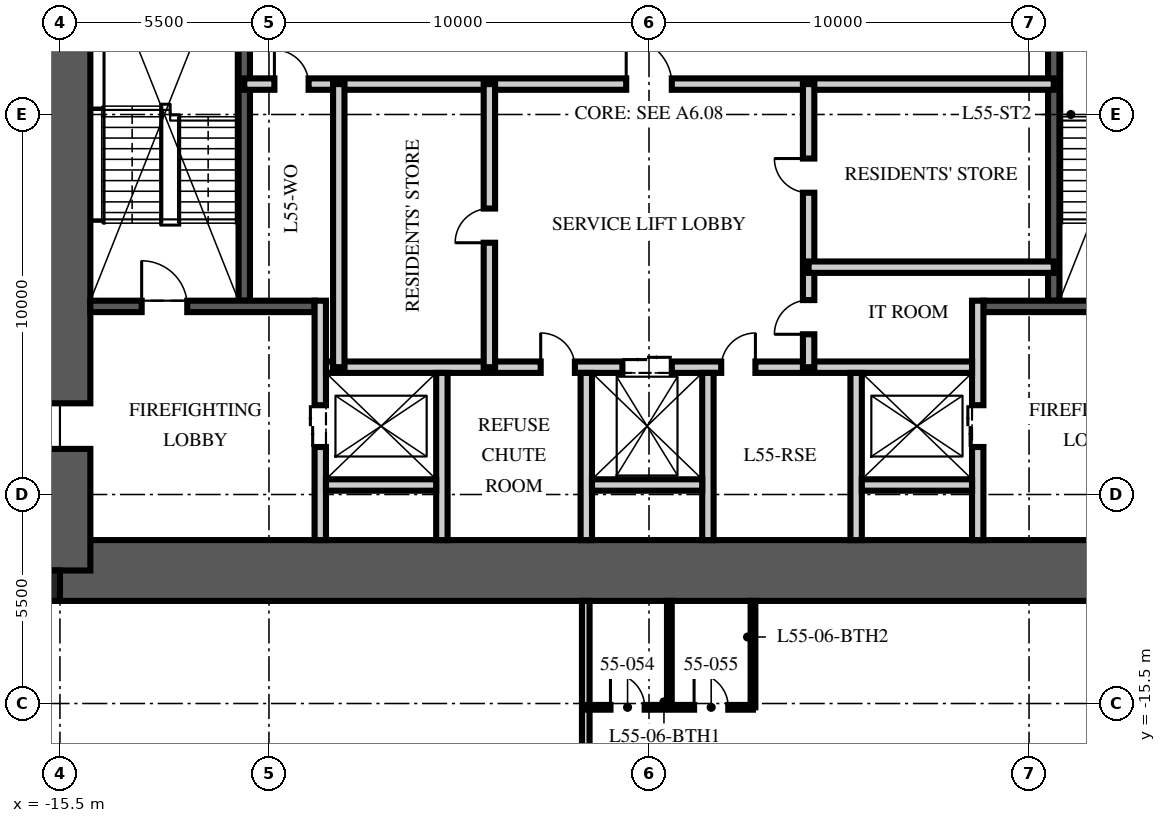
"""IFC4 building model, lengths in metres.
Left out: names, types, materials, properties, quantities, classifications, styles, units other than length and angle.
Written with IfcOpenShell. Run it as: python <this file> out.ifc"""

import sys

from ifc_helpers import new_model, si_unit, direction, frame, frame_2d, origin, origin_2d, place, context, subcontext, project, spatial, rectangle, extrude, element, fill, save


model = new_model("IFC4")
c1 = context("Model", 3, precision=1e-05, world=origin(), true_north=direction((0.0, 1.0)))
c2 = subcontext(c1, "Body", "Model", "MODEL_VIEW")
j1 = project(units=[si_unit("LENGTHUNIT", "METRE"), si_unit("PLANEANGLEUNIT", "RADIAN")], contexts=[c1])
p1 = place(None, origin())
s1 = spatial("IfcSite", under=j1, at=p1, CompositionType="ELEMENT")
p2 = place(p1, origin())
s2 = spatial("IfcBuilding", under=s1, at=p2, CompositionType="ELEMENT")
p3 = place(p2, frame((0.0, 0.0, 222.0)))
s3 = spatial("IfcBuildingStorey", under=s2, at=p3, CompositionType="ELEMENT", Elevation=222.0)
p4 = place(p3, frame((-15.5, -12.0, -0.25), z_axis=(0.0, 0.0, 1.0), x_axis=(1.0, 0.0, 0.0)))
e1 = element("IfcWall", 1, at=p4, inside=s3, PredefinedType="SHEAR", context=c2, shape_type="SweptSolid", body=[
    extrude(rectangle(XDim=31.0, YDim=1.6, at=frame_2d((15.5, 0.0))), origin(), (0.0, 0.0, 1.0), 3.75),
])
p5 = place(p3, frame((-15.5, -12.0, -0.25), z_axis=(0.0, 0.0, 1.0), x_axis=(0.0, 1.0, 0.0)))
e2 = element("IfcWall", 2, at=p5, inside=s3, PredefinedType="SHEAR", context=c2, shape_type="SweptSolid", body=[
    extrude(rectangle(XDim=24.0, YDim=1.6, at=frame_2d((12.0, 0.0))), origin(), (0.0, 0.0, 1.0), 3.75),
])
p6 = place(p5, frame((3.2, 0.0, 0.25)))
e3 = element("IfcOpeningElement", 3, at=p6, cuts=e2, PredefinedType="OPENING", context=c2, shape_type="SweptSolid", body=[
    extrude(rectangle(XDim=1.2, YDim=2.1, at=frame_2d((0.6, 1.05))), frame((0.0, 0.81, 0.0), z_axis=(0.0, -1.0, 0.0), x_axis=(1.0, 0.0, 0.0)), (0.0, 0.0, 1.0), 1.62),
])
p7 = place(p5, frame((19.3, 0.0, 0.25)))
e4 = element("IfcOpeningElement", 4, at=p7, cuts=e2, PredefinedType="OPENING", context=c2, shape_type="SweptSolid", body=[
    extrude(rectangle(XDim=1.8, YDim=2.1, at=frame_2d((0.9, 1.05))), frame((0.0, 0.81, 0.0), z_axis=(0.0, -1.0, 0.0), x_axis=(1.0, 0.0, 0.0)), (0.0, 0.0, 1.0), 1.62),
])
p8 = place(p3, frame((-15.9, -12.4, -0.25), z_axis=(0.0, 0.0, 1.0), x_axis=(1.0, 0.0, 0.0)))
e5 = element("IfcColumn", 5, at=p8, inside=s3, PredefinedType="COLUMN", context=c2, shape_type="SweptSolid", body=[
    extrude(rectangle(XDim=0.8, YDim=0.8, at=origin_2d()), origin(), (0.0, 0.0, 1.0), 3.75),
])
p9 = place(p3, frame((-10.65, -4.9, 0.0), z_axis=(0.0, 0.0, 1.0), x_axis=(0.0, 1.0, 0.0)))
e6 = element("IfcWall", 6, at=p9, inside=s3, PredefinedType="SOLIDWALL", context=c2, shape_type="SweptSolid", body=[
    extrude(rectangle(XDim=10.1, YDim=0.3, at=frame_2d((5.05, 0.0))), origin(), (0.0, 0.0, 1.0), 3.5),
])
p10 = place(p3, frame((-14.7, -5.05, 0.0), z_axis=(0.0, 0.0, 1.0), x_axis=(1.0, 0.0, 0.0)))
e7 = element("IfcWall", 7, at=p10, inside=s3, PredefinedType="SOLIDWALL", context=c2, shape_type="SweptSolid", body=[
    extrude(rectangle(XDim=5.9, YDim=0.3, at=frame_2d((2.95, 0.0))), origin(), (0.0, 0.0, 1.0), 3.5),
])
p11 = place(p10, frame((1.35, 0.0, 0.0)))
e8 = element("IfcOpeningElement", 8, at=p11, cuts=e7, PredefinedType="OPENING", context=c2, shape_type="SweptSolid", body=[
    extrude(rectangle(XDim=1.2, YDim=2.1, at=frame_2d((0.6, 1.05))), frame((0.0, 0.16, 0.0), z_axis=(0.0, -1.0, 0.0), x_axis=(1.0, 0.0, 0.0)), (0.0, 0.0, 1.0), 0.32),
])
p12 = place(p3, frame((-8.65, -11.2, 0.0), z_axis=(0.0, 0.0, 1.0), x_axis=(0.0, 1.0, 0.0)))
e9 = element("IfcWall", 9, at=p12, inside=s3, PredefinedType="PARTITIONING", context=c2, shape_type="SweptSolid", body=[
    extrude(rectangle(XDim=6.3, YDim=0.3, at=frame_2d((3.15, 0.0))), origin(), (0.0, 0.0, 1.0), 3.5),
])
p13 = place(p12, frame((2.45, 0.0, 0.0)))
e10 = element("IfcOpeningElement", 10, at=p13, cuts=e9, PredefinedType="OPENING", context=c2, shape_type="SweptSolid", body=[
    extrude(rectangle(XDim=1.1, YDim=2.1, at=frame_2d((0.55, 1.05))), frame((0.0, 0.16, 0.0), z_axis=(0.0, -1.0, 0.0), x_axis=(1.0, 0.0, 0.0)), (0.0, 0.0, 1.0), 0.32),
])
p14 = place(p3, frame((10.65, -4.9, 0.0), z_axis=(0.0, 0.0, 1.0), x_axis=(0.0, 1.0, 0.0)))
e11 = element("IfcWall", 11, at=p14, inside=s3, PredefinedType="SOLIDWALL", context=c2, shape_type="SweptSolid", body=[
    extrude(rectangle(XDim=10.1, YDim=0.3, at=frame_2d((5.05, 0.0))), origin(), (0.0, 0.0, 1.0), 3.5),
])
p15 = place(p3, frame((14.7, -5.05, 0.0), z_axis=(0.0, 0.0, 1.0), x_axis=(-1.0, 0.0, 0.0)))
e12 = element("IfcWall", 12, at=p15, inside=s3, PredefinedType="SOLIDWALL", context=c2, shape_type="SweptSolid", body=[
    extrude(rectangle(XDim=5.9, YDim=0.3, at=frame_2d((2.95, 0.0))), origin(), (0.0, 0.0, 1.0), 3.5),
])
p16 = place(p15, frame((1.35, 0.0, 0.0)))
e13 = element("IfcOpeningElement", 13, at=p16, cuts=e12, PredefinedType="OPENING", context=c2, shape_type="SweptSolid", body=[
    extrude(rectangle(XDim=1.2, YDim=2.1, at=frame_2d((0.6, 1.05))), frame((0.0, 0.16, 0.0), z_axis=(0.0, -1.0, 0.0), x_axis=(1.0, 0.0, 0.0)), (0.0, 0.0, 1.0), 0.32),
])
p17 = place(p3, frame((8.65, -11.2, 0.0), z_axis=(0.0, 0.0, 1.0), x_axis=(0.0, 1.0, 0.0)))
e14 = element("IfcWall", 14, at=p17, inside=s3, PredefinedType="PARTITIONING", context=c2, shape_type="SweptSolid", body=[
    extrude(rectangle(XDim=6.3, YDim=0.3, at=frame_2d((3.15, 0.0))), origin(), (0.0, 0.0, 1.0), 3.5),
])
p18 = place(p17, frame((2.45, 0.0, 0.0)))
e15 = element("IfcOpeningElement", 15, at=p18, cuts=e14, PredefinedType="OPENING", context=c2, shape_type="SweptSolid", body=[
    extrude(rectangle(XDim=1.1, YDim=2.1, at=frame_2d((0.55, 1.05))), frame((0.0, 0.16, 0.0), z_axis=(0.0, -1.0, 0.0), x_axis=(1.0, 0.0, 0.0)), (0.0, 0.0, 1.0), 0.32),
])
p19 = place(p3, frame((-8.5, -6.65, 0.0), z_axis=(0.0, 0.0, 1.0), x_axis=(1.0, 0.0, 0.0)))
e16 = element("IfcWall", 16, at=p19, inside=s3, PredefinedType="PARTITIONING", context=c2, shape_type="SweptSolid", body=[
    extrude(rectangle(XDim=17.0, YDim=0.3, at=frame_2d((8.5, 0.0))), origin(), (0.0, 0.0, 1.0), 3.5),
])
p20 = place(p19, frame((7.8, 0.0, 0.0)))
e17 = element("IfcOpeningElement", 17, at=p20, cuts=e16, PredefinedType="OPENING", context=c2, shape_type="SweptSolid", body=[
    extrude(rectangle(XDim=1.3, YDim=2.4, at=frame_2d((0.65, 1.2))), frame((0.0, 0.16, 0.0), z_axis=(0.0, -1.0, 0.0), x_axis=(1.0, 0.0, 0.0)), (0.0, 0.0, 1.0), 0.32),
])
p21 = place(p19, frame((5.65, 0.0, 0.0)))
e18 = element("IfcOpeningElement", 18, at=p21, cuts=e16, PredefinedType="OPENING", context=c2, shape_type="SweptSolid", body=[
    extrude(rectangle(XDim=0.9, YDim=2.1, at=frame_2d((0.45, 1.05))), frame((0.0, 0.16, 0.0), z_axis=(0.0, -1.0, 0.0), x_axis=(1.0, 0.0, 0.0)), (0.0, 0.0, 1.0), 0.32),
])
p22 = place(p19, frame((10.4, 0.0, 0.0)))
e19 = element("IfcOpeningElement", 19, at=p22, cuts=e16, PredefinedType="OPENING", context=c2, shape_type="SweptSolid", body=[
    extrude(rectangle(XDim=0.9, YDim=2.1, at=frame_2d((0.45, 1.05))), frame((0.0, 0.16, 0.0), z_axis=(0.0, -1.0, 0.0), x_axis=(1.0, 0.0, 0.0)), (0.0, 0.0, 1.0), 0.32),
])
for number, where, z_axis, x_axis in (
    (20, (-5.45, -11.2, 0.0), (0.0, 0.0, 1.0), (0.0, 1.0, 0.0)),
    (21, (-1.65, -11.2, 0.0), (0.0, 0.0, 1.0), (0.0, 1.0, 0.0)),
    (22, (1.55, -11.2, 0.0), (0.0, 0.0, 1.0), (0.0, 1.0, 0.0)),
    (23, (5.45, -11.2, 0.0), (0.0, 0.0, 1.0), (0.0, 1.0, 0.0)),
):
    element("IfcWall", number, at=place(p3, frame(where, z_axis=z_axis, x_axis=x_axis)), inside=s3, PredefinedType="PARTITIONING", context=c2, shape_type="SweptSolid", body=[
        extrude(rectangle(XDim=4.4, YDim=0.3, at=frame_2d((2.2, 0.0))), origin(), (0.0, 0.0, 1.0), 3.5),
    ])
for number, where, z_axis, x_axis in (
    (24, (-8.5, -9.75, 0.0), (0.0, 0.0, 1.0), (1.0, 0.0, 0.0)),
    (25, (-1.5, -9.75, 0.0), (0.0, 0.0, 1.0), (1.0, 0.0, 0.0)),
    (26, (5.6, -9.75, 0.0), (0.0, 0.0, 1.0), (1.0, 0.0, 0.0)),
):
    element("IfcWall", number, at=place(p3, frame(where, z_axis=z_axis, x_axis=x_axis)), inside=s3, PredefinedType="PARTITIONING", context=c2, shape_type="SweptSolid", body=[
        extrude(rectangle(XDim=2.9, YDim=0.3, at=frame_2d((1.45, 0.0))), origin(), (0.0, 0.0, 1.0), 3.5),
    ])
p23 = place(p3, frame((-10.65, 0.8, 0.0), z_axis=(0.0, 0.0, 1.0), x_axis=(1.0, 0.0, 0.0)))
e27 = element("IfcWall", 27, at=p23, inside=s3, PredefinedType="PARTITIONING", context=c2, shape_type="SweptSolid", body=[
    extrude(rectangle(XDim=21.3, YDim=0.3, at=frame_2d((10.65, 0.0))), origin(), (0.0, 0.0, 1.0), 3.5),
])
p24 = place(p23, frame((10.05, 0.0, 0.0)))
e28 = element("IfcOpeningElement", 28, at=p24, cuts=e27, PredefinedType="OPENING", context=c2, shape_type="SweptSolid", body=[
    extrude(rectangle(XDim=1.2, YDim=2.1, at=frame_2d((0.6, 1.05))), frame((0.0, 0.16, 0.0), z_axis=(0.0, -1.0, 0.0), x_axis=(1.0, 0.0, 0.0)), (0.0, 0.0, 1.0), 0.32),
])
p25 = place(p23, frame((0.793, 0.0, 0.0)))
e29 = element("IfcOpeningElement", 29, at=p25, cuts=e27, PredefinedType="OPENING", context=c2, shape_type="SweptSolid", body=[
    extrude(rectangle(XDim=0.9, YDim=2.1, at=frame_2d((0.45, 1.05))), frame((0.0, 0.16, 0.0), z_axis=(0.0, -1.0, 0.0), x_axis=(1.0, 0.0, 0.0)), (0.0, 0.0, 1.0), 0.32),
])
p26 = place(p3, frame((-4.2, -6.65, 0.0), z_axis=(0.0, 0.0, 1.0), x_axis=(0.0, 1.0, 0.0)))
e30 = element("IfcWall", 30, at=p26, inside=s3, PredefinedType="PARTITIONING", context=c2, shape_type="SweptSolid", body=[
    extrude(rectangle(XDim=7.45, YDim=0.3, at=frame_2d((3.725, 0.0))), origin(), (0.0, 0.0, 1.0), 3.5),
])
p27 = place(p26, frame((3.275, 0.0, 0.0)))
e31 = element("IfcOpeningElement", 31, at=p27, cuts=e30, PredefinedType="OPENING", context=c2, shape_type="SweptSolid", body=[
    extrude(rectangle(XDim=0.9, YDim=2.1, at=frame_2d((0.45, 1.05))), frame((0.0, 0.16, 0.0), z_axis=(0.0, -1.0, 0.0), x_axis=(1.0, 0.0, 0.0)), (0.0, 0.0, 1.0), 0.32),
])
p28 = place(p3, frame((4.2, -6.65, 0.0), z_axis=(0.0, 0.0, 1.0), x_axis=(0.0, 1.0, 0.0)))
e32 = element("IfcWall", 32, at=p28, inside=s3, PredefinedType="PARTITIONING", context=c2, shape_type="SweptSolid", body=[
    extrude(rectangle(XDim=7.45, YDim=0.3, at=frame_2d((3.725, 0.0))), origin(), (0.0, 0.0, 1.0), 3.5),
])
p29 = place(p28, frame((0.866, 0.0, 0.0)))
e33 = element("IfcOpeningElement", 33, at=p29, cuts=e32, PredefinedType="OPENING", context=c2, shape_type="SweptSolid", body=[
    extrude(rectangle(XDim=0.9, YDim=2.1, at=frame_2d((0.45, 1.05))), frame((0.0, 0.16, 0.0), z_axis=(0.0, -1.0, 0.0), x_axis=(1.0, 0.0, 0.0)), (0.0, 0.0, 1.0), 0.32),
])
p30 = place(p28, frame((4.591, 0.0, 0.0)))
e34 = element("IfcOpeningElement", 34, at=p30, cuts=e32, PredefinedType="OPENING", context=c2, shape_type="SweptSolid", body=[
    extrude(rectangle(XDim=0.9, YDim=2.1, at=frame_2d((0.45, 1.05))), frame((0.0, 0.16, 0.0), z_axis=(0.0, -1.0, 0.0), x_axis=(1.0, 0.0, 0.0)), (0.0, 0.0, 1.0), 0.32),
])
p31 = place(p3, frame((-8.163, -6.65, 0.0), z_axis=(0.0, 0.0, 1.0), x_axis=(0.0, 1.0, 0.0)))
e35 = element("IfcWall", 35, at=p31, inside=s3, PredefinedType="PARTITIONING", context=c2, shape_type="SweptSolid", body=[
    extrude(rectangle(XDim=7.45, YDim=0.3, at=frame_2d((3.725, 0.0))), origin(), (0.0, 0.0, 1.0), 3.5),
])
p32 = place(p3, frame((10.65, -4.018, 0.0), z_axis=(0.0, 0.0, 1.0), x_axis=(-1.0, 0.0, 0.0)))
e36 = element("IfcWall", 36, at=p32, inside=s3, PredefinedType="PARTITIONING", context=c2, shape_type="SweptSolid", body=[
    extrude(rectangle(XDim=6.45, YDim=0.3, at=frame_2d((3.225, 0.0))), origin(), (0.0, 0.0, 1.0), 3.5),
])
p33 = place(p3, frame((-1.664, -12.8, 0.0), z_axis=(0.0, 0.0, 1.0), x_axis=(0.0, -1.0, 0.0)))
e37 = element("IfcWall", 37, at=p33, inside=s3, PredefinedType="PARTITIONING", context=c2, shape_type="SweptSolid", body=[
    extrude(rectangle(XDim=13.4, YDim=0.2, at=frame_2d((6.7, 0.0))), origin(), (0.0, 0.0, 1.0), 2.91),
])
p34 = place(p3, frame((-1.664, -15.6, 0.0), z_axis=(0.0, 0.0, 1.0), x_axis=(1.0, 0.0, 0.0)))
e38 = element("IfcWall", 38, at=p34, inside=s3, PredefinedType="PARTITIONING", context=c2, shape_type="SweptSolid", body=[
    extrude(rectangle(XDim=4.4, YDim=0.125, at=frame_2d((2.2, 0.0))), origin(), (0.0, 0.0, 1.0), 2.6),
])
p35 = place(p34, frame((0.65, 0.0, 0.0)))
e39 = element("IfcOpeningElement", 39, at=p35, cuts=e38, PredefinedType="OPENING", context=c2, shape_type="SweptSolid", body=[
    extrude(rectangle(XDim=0.9, YDim=2.1, at=frame_2d((0.45, 1.05))), frame((0.0, 0.073, 0.0), z_axis=(0.0, -1.0, 0.0), x_axis=(1.0, 0.0, 0.0)), (0.0, 0.0, 1.0), 0.145),
])
p36 = place(p34, frame((2.85, 0.0, 0.0)))
e40 = element("IfcOpeningElement", 40, at=p36, cuts=e38, PredefinedType="OPENING", context=c2, shape_type="SweptSolid", body=[
    extrude(rectangle(XDim=0.9, YDim=2.1, at=frame_2d((0.45, 1.05))), frame((0.0, 0.073, 0.0), z_axis=(0.0, -1.0, 0.0), x_axis=(1.0, 0.0, 0.0)), (0.0, 0.0, 1.0), 0.145),
])
for number, where, z_axis, x_axis in (
    (41, (0.536, -12.8, 0.0), (0.0, 0.0, 1.0), (0.0, -1.0, 0.0)),
    (42, (2.736, -12.8, 0.0), (0.0, 0.0, 1.0), (0.0, -1.0, 0.0)),
):
    element("IfcWall", number, at=place(p3, frame(where, z_axis=z_axis, x_axis=x_axis)), inside=s3, PredefinedType="PARTITIONING", context=c2, shape_type="SweptSolid", body=[
        extrude(rectangle(XDim=2.8, YDim=0.125, at=frame_2d((1.4, 0.0))), origin(), (0.0, 0.0, 1.0), 3.5),
    ])
p37 = place(p11, origin())
e43 = element("IfcDoor", 43, at=p37, inside=s3, OperationType="SINGLE_SWING_LEFT", PredefinedType="DOOR", context=c2, shape_type="SweptSolid", body=[
    extrude(rectangle(XDim=1.2, YDim=2.1, at=frame_2d((0.6, 1.05))), frame((0.0, 0.025, 0.0), z_axis=(0.0, -1.0, 0.0), x_axis=(1.0, 0.0, 0.0)), (0.0, 0.0, 1.0), 0.05),
])
fill(e8, e43)
p38 = place(p6, origin())
e44 = element("IfcDoor", 44, at=p38, inside=s3, OperationType="SINGLE_SWING_LEFT", PredefinedType="DOOR", context=c2, shape_type="SweptSolid", body=[
    extrude(rectangle(XDim=1.2, YDim=2.1, at=frame_2d((0.6, 1.05))), frame((0.0, 0.025, 0.0), z_axis=(0.0, -1.0, 0.0), x_axis=(1.0, 0.0, 0.0)), (0.0, 0.0, 1.0), 0.05),
])
fill(e3, e44)
p39 = place(p13, origin())
e45 = element("IfcDoor", 45, at=p39, inside=s3, OperationType="DOUBLE_DOOR_SLIDING", PredefinedType="DOOR", context=c2, shape_type="SweptSolid", body=[
    extrude(rectangle(XDim=1.1, YDim=2.1, at=frame_2d((0.55, 1.05))), frame((0.0, 0.025, 0.0), z_axis=(0.0, -1.0, 0.0), x_axis=(1.0, 0.0, 0.0)), (0.0, 0.0, 1.0), 0.05),
])
fill(e10, e45)
p40 = place(p18, origin())
e46 = element("IfcDoor", 46, at=p40, inside=s3, OperationType="DOUBLE_DOOR_SLIDING", PredefinedType="DOOR", context=c2, shape_type="SweptSolid", body=[
    extrude(rectangle(XDim=1.1, YDim=2.1, at=frame_2d((0.55, 1.05))), frame((0.0, 0.025, 0.0), z_axis=(0.0, -1.0, 0.0), x_axis=(1.0, 0.0, 0.0)), (0.0, 0.0, 1.0), 0.05),
])
fill(e15, e46)
p41 = place(p20, origin())
e47 = element("IfcDoor", 47, at=p41, inside=s3, OperationType="DOUBLE_DOOR_SLIDING", PredefinedType="DOOR", context=c2, shape_type="SweptSolid", body=[
    extrude(rectangle(XDim=1.3, YDim=2.4, at=frame_2d((0.65, 1.2))), frame((0.0, 0.025, 0.0), z_axis=(0.0, -1.0, 0.0), x_axis=(1.0, 0.0, 0.0)), (0.0, 0.0, 1.0), 0.05),
])
fill(e17, e47)
p42 = place(p24, origin())
e48 = element("IfcDoor", 48, at=p42, inside=s3, OperationType="SINGLE_SWING_LEFT", PredefinedType="DOOR", context=c2, shape_type="SweptSolid", body=[
    extrude(rectangle(XDim=1.2, YDim=2.1, at=frame_2d((0.6, 1.05))), frame((0.0, 0.025, 0.0), z_axis=(0.0, -1.0, 0.0), x_axis=(1.0, 0.0, 0.0)), (0.0, 0.0, 1.0), 0.05),
])
fill(e28, e48)
p43 = place(p21, origin())
e49 = element("IfcDoor", 49, at=p43, inside=s3, OperationType="SINGLE_SWING_LEFT", PredefinedType="DOOR", context=c2, shape_type="SweptSolid", body=[
    extrude(rectangle(XDim=0.9, YDim=2.1, at=frame_2d((0.45, 1.05))), frame((0.0, 0.025, 0.0), z_axis=(0.0, -1.0, 0.0), x_axis=(1.0, 0.0, 0.0)), (0.0, 0.0, 1.0), 0.05),
])
fill(e18, e49)
p44 = place(p22, origin())
e50 = element("IfcDoor", 50, at=p44, inside=s3, OperationType="SINGLE_SWING_RIGHT", PredefinedType="DOOR", context=c2, shape_type="SweptSolid", body=[
    extrude(rectangle(XDim=0.9, YDim=2.1, at=frame_2d((0.45, 1.05))), frame((0.0, 0.025, 0.0), z_axis=(0.0, -1.0, 0.0), x_axis=(1.0, 0.0, 0.0)), (0.0, 0.0, 1.0), 0.05),
])
fill(e19, e50)
p45 = place(p27, origin())
e51 = element("IfcDoor", 51, at=p45, inside=s3, OperationType="SINGLE_SWING_LEFT", PredefinedType="DOOR", context=c2, shape_type="SweptSolid", body=[
    extrude(rectangle(XDim=0.9, YDim=2.1, at=frame_2d((0.45, 1.05))), frame((0.0, 0.025, 0.0), z_axis=(0.0, -1.0, 0.0), x_axis=(1.0, 0.0, 0.0)), (0.0, 0.0, 1.0), 0.05),
])
fill(e31, e51)
p46 = place(p25, origin())
e52 = element("IfcDoor", 52, at=p46, inside=s3, OperationType="SINGLE_SWING_LEFT", PredefinedType="DOOR", context=c2, shape_type="SweptSolid", body=[
    extrude(rectangle(XDim=0.9, YDim=2.1, at=frame_2d((0.45, 1.05))), frame((0.0, 0.025, 0.0), z_axis=(0.0, -1.0, 0.0), x_axis=(1.0, 0.0, 0.0)), (0.0, 0.0, 1.0), 0.05),
])
fill(e29, e52)
p47 = place(p29, origin())
e53 = element("IfcDoor", 53, at=p47, inside=s3, OperationType="SINGLE_SWING_LEFT", PredefinedType="DOOR", context=c2, shape_type="SweptSolid", body=[
    extrude(rectangle(XDim=0.9, YDim=2.1, at=frame_2d((0.45, 1.05))), frame((0.0, 0.025, 0.0), z_axis=(0.0, -1.0, 0.0), x_axis=(1.0, 0.0, 0.0)), (0.0, 0.0, 1.0), 0.05),
])
fill(e33, e53)
p48 = place(p30, origin())
e54 = element("IfcDoor", 54, at=p48, inside=s3, OperationType="SINGLE_SWING_RIGHT", PredefinedType="DOOR", context=c2, shape_type="SweptSolid", body=[
    extrude(rectangle(XDim=0.9, YDim=2.1, at=frame_2d((0.45, 1.05))), frame((0.0, 0.025, 0.0), z_axis=(0.0, -1.0, 0.0), x_axis=(1.0, 0.0, 0.0)), (0.0, 0.0, 1.0), 0.05),
])
fill(e34, e54)
p49 = place(p35, origin())
e55 = element("IfcDoor", 55, at=p49, inside=s3, OperationType="SINGLE_SWING_LEFT", PredefinedType="DOOR", context=c2, shape_type="SweptSolid", body=[
    extrude(rectangle(XDim=0.9, YDim=2.1, at=frame_2d((0.45, 1.05))), frame((0.0, 0.025, 0.0), z_axis=(0.0, -1.0, 0.0), x_axis=(1.0, 0.0, 0.0)), (0.0, 0.0, 1.0), 0.05),
])
fill(e39, e55)
p50 = place(p36, origin())
e56 = element("IfcDoor", 56, at=p50, inside=s3, OperationType="SINGLE_SWING_LEFT", PredefinedType="DOOR", context=c2, shape_type="SweptSolid", body=[
    extrude(rectangle(XDim=0.9, YDim=2.1, at=frame_2d((0.45, 1.05))), frame((0.0, 0.025, 0.0), z_axis=(0.0, -1.0, 0.0), x_axis=(1.0, 0.0, 0.0)), (0.0, 0.0, 1.0), 0.05),
])
fill(e40, e56)
save(model, sys.argv[1])
